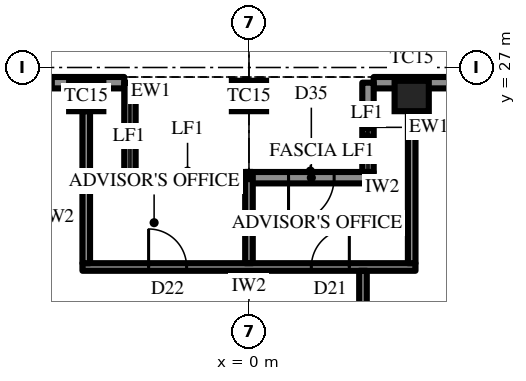
"""IFC4 building model, lengths in metres.
Left out: names, types, materials, properties, quantities, classifications, styles, units other than length and angle.
Written with IfcOpenShell. Run it as: python <this file> out.ifc"""

import sys

from ifc_helpers import new_model, si_unit, direction, frame, frame_2d, origin, origin_2d, place, context, subcontext, project, spatial, rectangle, extrude, element, fill, save


model = new_model("IFC4")
c1 = context("Model", 3, precision=1e-05, world=origin(), true_north=direction((0.0, 1.0)))
c2 = subcontext(c1, "Body", "Model", "MODEL_VIEW")
j1 = project(units=[si_unit("LENGTHUNIT", "METRE"), si_unit("PLANEANGLEUNIT", "RADIAN")], contexts=[c1])
p1 = place(None, origin())
s1 = spatial("IfcSite", under=j1, at=p1, CompositionType="ELEMENT")
p2 = place(p1, origin())
s2 = spatial("IfcBuilding", under=s1, at=p2, CompositionType="ELEMENT")
p3 = place(p2, frame((0.0, 0.0, 366.1)))
s3 = spatial("IfcBuildingStorey", under=s2, at=p3, CompositionType="ELEMENT", Elevation=366.1)
for number, where, z_axis, x_axis in (
    (1, (4.282, 26.25, 0.0), (0.0, 0.0, 1.0), (-1.0, 0.0, 0.0)),
    (2, (0.0, 26.25, 0.0), (0.0, 0.0, 1.0), (-1.0, 0.0, 0.0)),
    (3, (-4.282, 26.25, 0.0), (0.0, 0.0, 1.0), (-1.0, 0.0, 0.0)),
):
    element("IfcColumn", number, at=place(p3, frame(where, z_axis=z_axis, x_axis=x_axis)), inside=s3, PredefinedType="COLUMN", context=c2, shape_type="SweptSolid", body=[
        extrude(rectangle(XDim=0.9, YDim=0.8, at=origin_2d()), origin(), (0.0, 0.0, 1.0), 4.2),
    ])
p4 = place(p3, frame((12.846, 26.6, 0.0), z_axis=(0.0, 0.0, 1.0), x_axis=(-1.0, 0.0, 0.0)))
e4 = element("IfcWall", 4, at=p4, inside=s3, PredefinedType="SOLIDWALL", context=c2, shape_type="SweptSolid", body=[
    extrude(rectangle(XDim=9.564, YDim=0.3, at=frame_2d((4.782, 0.0))), origin(), (0.0, 0.0, 1.0), 2.9),
])
p5 = place(p4, frame((0.866, 0.0, 0.6)))
e5 = element("IfcOpeningElement", 5, at=p5, cuts=e4, PredefinedType="OPENING", context=c2, shape_type="SweptSolid", body=[
    extrude(rectangle(XDim=2.55, YDim=2.05, at=frame_2d((1.275, 1.025))), frame((0.0, 0.16, 0.0), z_axis=(0.0, -1.0, 0.0), x_axis=(1.0, 0.0, 0.0)), (0.0, 0.0, 1.0), 0.32),
])
p6 = place(p4, frame((5.823, 0.0, 0.0)))
e6 = element("IfcOpeningElement", 6, at=p6, cuts=e4, PredefinedType="OPENING", context=c2, shape_type="SweptSolid", body=[
    extrude(rectangle(XDim=1.2, YDim=2.4, at=frame_2d((0.6, 1.2))), frame((0.0, 0.16, 0.0), z_axis=(0.0, -1.0, 0.0), x_axis=(1.0, 0.0, 0.0)), (0.0, 0.0, 1.0), 0.32),
])
p7 = place(p3, frame((-3.282, 26.6, 0.0), z_axis=(0.0, 0.0, 1.0), x_axis=(-1.0, 0.0, 0.0)))
e7 = element("IfcWall", 7, at=p7, inside=s3, PredefinedType="SOLIDWALL", context=c2, shape_type="SweptSolid", body=[
    extrude(rectangle(XDim=9.564, YDim=0.3, at=frame_2d((4.782, 0.0))), origin(), (0.0, 0.0, 1.0), 2.9),
])
p8 = place(p7, frame((1.866, 0.0, 0.6)))
e8 = element("IfcOpeningElement", 8, at=p8, cuts=e7, PredefinedType="OPENING", context=c2, shape_type="SweptSolid", body=[
    extrude(rectangle(XDim=2.55, YDim=2.05, at=frame_2d((1.275, 1.025))), frame((0.0, 0.16, 0.0), z_axis=(0.0, -1.0, 0.0), x_axis=(1.0, 0.0, 0.0)), (0.0, 0.0, 1.0), 0.32),
])
p9 = place(p7, frame((6.148, 0.0, 0.6)))
e9 = element("IfcOpeningElement", 9, at=p9, cuts=e7, PredefinedType="OPENING", context=c2, shape_type="SweptSolid", body=[
    extrude(rectangle(XDim=2.55, YDim=2.05, at=frame_2d((1.275, 1.025))), frame((0.0, 0.16, 0.0), z_axis=(0.0, -1.0, 0.0), x_axis=(1.0, 0.0, 0.0)), (0.0, 0.0, 1.0), 0.32),
])
for number, where, z_axis, x_axis in (
    (10, (3.132, 26.6, 0.0), (0.0, 0.0, 1.0), (0.0, -1.0, 0.0)),
    (11, (-3.132, 26.6, 0.0), (0.0, 0.0, 1.0), (0.0, -1.0, 0.0)),
):
    element("IfcWall", number, at=place(p3, frame(where, z_axis=z_axis, x_axis=x_axis)), inside=s3, PredefinedType="SOLIDWALL", context=c2, shape_type="SweptSolid", body=[
        extrude(rectangle(XDim=2.35, YDim=0.3, at=frame_2d((1.175, 0.0))), origin(), (0.0, 0.0, 1.0), 2.9),
    ])
p10 = place(p3, frame((3.282, 24.1, 0.0), z_axis=(0.0, 0.0, 1.0), x_axis=(-1.0, 0.0, 0.0)))
e12 = element("IfcWall", 12, at=p10, inside=s3, PredefinedType="SOLIDWALL", context=c2, shape_type="SweptSolid", body=[
    extrude(rectangle(XDim=6.564, YDim=0.3, at=frame_2d((3.282, 0.0))), origin(), (0.0, 0.0, 1.0), 2.9),
])
p11 = place(p10, frame((1.041, 0.0, 0.0)))
e13 = element("IfcOpeningElement", 13, at=p11, cuts=e12, PredefinedType="OPENING", context=c2, shape_type="SweptSolid", body=[
    extrude(rectangle(XDim=1.2, YDim=2.4, at=frame_2d((0.6, 1.2))), frame((0.0, 0.16, 0.0), z_axis=(0.0, -1.0, 0.0), x_axis=(1.0, 0.0, 0.0)), (0.0, 0.0, 1.0), 0.32),
])
p12 = place(p3, frame((4.382, 21.75, 0.0), z_axis=(0.0, 0.0, 1.0), x_axis=(-1.0, 0.0, 0.0)))
e14 = element("IfcWall", 14, at=p12, inside=s3, PredefinedType="PARTITIONING", context=c2, shape_type="SweptSolid", body=[
    extrude(rectangle(XDim=8.764, YDim=0.2, at=frame_2d((4.382, 0.0))), origin(), (0.0, 0.0, 1.0), 4.0),
])
p13 = place(p12, frame((1.741, 0.0, 0.0)))
e15 = element("IfcOpeningElement", 15, at=p13, cuts=e14, PredefinedType="OPENING", context=c2, shape_type="SweptSolid", body=[
    extrude(rectangle(XDim=1.0, YDim=2.2, at=frame_2d((0.5, 1.1))), frame((0.0, 0.11, 0.0), z_axis=(0.0, -1.0, 0.0), x_axis=(1.0, 0.0, 0.0)), (0.0, 0.0, 1.0), 0.22),
])
p14 = place(p12, frame((6.023, 0.0, 0.0)))
e16 = element("IfcOpeningElement", 16, at=p14, cuts=e14, PredefinedType="OPENING", context=c2, shape_type="SweptSolid", body=[
    extrude(rectangle(XDim=1.0, YDim=2.2, at=frame_2d((0.5, 1.1))), frame((0.0, 0.11, 0.0), z_axis=(0.0, -1.0, 0.0), x_axis=(1.0, 0.0, 0.0)), (0.0, 0.0, 1.0), 0.22),
])
p15 = place(p3, frame((4.282, 21.85, 0.0), z_axis=(0.0, 0.0, 1.0), x_axis=(0.0, 1.0, 0.0)))
e17 = element("IfcWall", 17, at=p15, inside=s3, PredefinedType="PARTITIONING", context=c2, shape_type="SweptSolid", body=[
    extrude(rectangle(XDim=4.0, YDim=0.2, at=frame_2d((2.0, 0.0))), origin(), (0.0, 0.0, 1.0), 2.992),
])
p16 = place(p3, frame((0.0, 21.85, 0.0), z_axis=(0.0, 0.0, 1.0), x_axis=(0.0, 1.0, 0.0)))
e18 = element("IfcWall", 18, at=p16, inside=s3, PredefinedType="PARTITIONING", context=c2, shape_type="SweptSolid", body=[
    extrude(rectangle(XDim=2.401, YDim=0.2, at=frame_2d((1.2, 0.0))), origin(), (0.0, 0.0, 1.0), 2.992),
])
p17 = place(p3, frame((-4.282, 21.85, 0.0), z_axis=(0.0, 0.0, 1.0), x_axis=(0.0, 1.0, 0.0)))
e19 = element("IfcWall", 19, at=p17, inside=s3, PredefinedType="PARTITIONING", context=c2, shape_type="SweptSolid", body=[
    extrude(rectangle(XDim=4.0, YDim=0.2, at=frame_2d((2.0, 0.0))), origin(), (0.0, 0.0, 1.0), 2.992),
])
p18 = place(p3, frame((3.0, 18.2, 0.0), z_axis=(0.0, 0.0, 1.0), x_axis=(0.0, 1.0, 0.0)))
e20 = element("IfcWall", 20, at=p18, inside=s3, PredefinedType="PARTITIONING", context=c2, shape_type="SweptSolid", body=[
    extrude(rectangle(XDim=3.45, YDim=0.2, at=frame_2d((1.725, 0.0))), origin(), (0.0, 0.0, 1.0), 4.0),
])
p19 = place(p8, origin())
e21 = element("IfcWindow", 21, at=p19, inside=s3, PartitioningType="SINGLE_PANEL", PredefinedType="WINDOW", context=c2, shape_type="SweptSolid", body=[
    extrude(rectangle(XDim=2.55, YDim=2.05, at=frame_2d((1.275, 1.025))), frame((0.0, 0.03, 0.0), z_axis=(0.0, -1.0, 0.0), x_axis=(1.0, 0.0, 0.0)), (0.0, 0.0, 1.0), 0.06),
])
fill(e8, e21)
p20 = place(p11, origin())
e22 = element("IfcDoor", 22, at=p20, inside=s3, OperationType="SINGLE_SWING_LEFT", PredefinedType="DOOR", context=c2, shape_type="SweptSolid", body=[
    extrude(rectangle(XDim=1.2, YDim=2.4, at=frame_2d((0.6, 1.2))), frame((0.0, 0.025, 0.0), z_axis=(0.0, -1.0, 0.0), x_axis=(1.0, 0.0, 0.0)), (0.0, 0.0, 1.0), 0.05),
])
fill(e13, e22)
p21 = place(p13, frame((1.0, 0.0, 0.0), z_axis=(0.0, 0.0, 1.0), x_axis=(-1.0, 0.0, 0.0)))
e23 = element("IfcDoor", 23, at=p21, inside=s3, OperationType="SINGLE_SWING_LEFT", PredefinedType="DOOR", context=c2, shape_type="SweptSolid", body=[
    extrude(rectangle(XDim=1.0, YDim=2.2, at=frame_2d((0.5, 1.1))), frame((0.0, 0.025, 0.0), z_axis=(0.0, -1.0, 0.0), x_axis=(1.0, 0.0, 0.0)), (0.0, 0.0, 1.0), 0.05),
])
fill(e15, e23)
p22 = place(p14, frame((1.0, 0.0, 0.0), z_axis=(0.0, 0.0, 1.0), x_axis=(-1.0, 0.0, 0.0)))
e24 = element("IfcDoor", 24, at=p22, inside=s3, OperationType="SINGLE_SWING_RIGHT", PredefinedType="DOOR", context=c2, shape_type="SweptSolid", body=[
    extrude(rectangle(XDim=1.0, YDim=2.2, at=frame_2d((0.5, 1.1))), frame((0.0, 0.025, 0.0), z_axis=(0.0, -1.0, 0.0), x_axis=(1.0, 0.0, 0.0)), (0.0, 0.0, 1.0), 0.05),
])
fill(e16, e24)
save(model, sys.argv[1])
